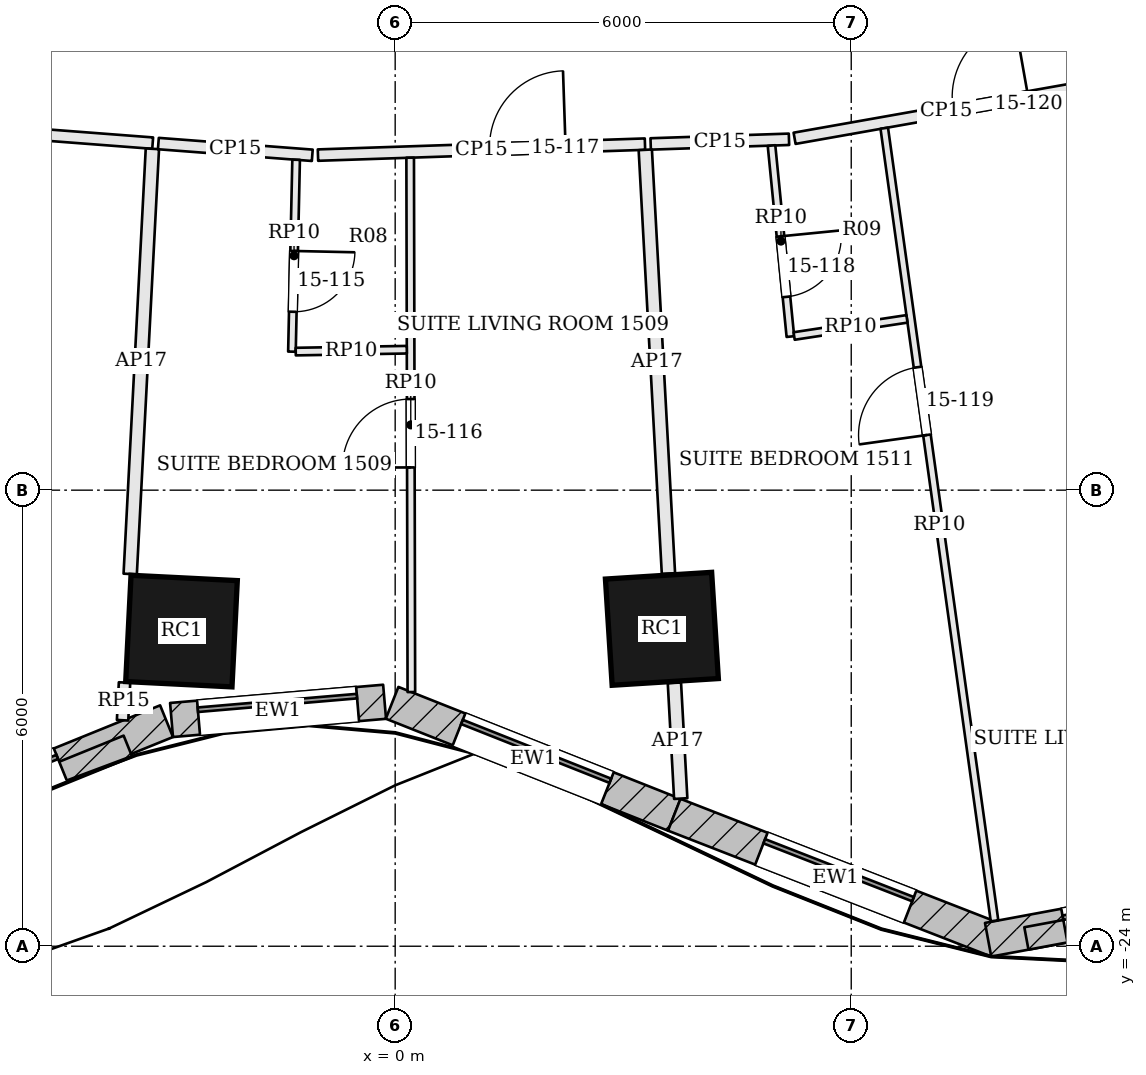
"""IFC4 building model, lengths in metres.
Left out: names, types, materials, properties, quantities, classifications, styles, units other than length and angle.
Written with IfcOpenShell. Run it as: python <this file> out.ifc"""

import sys

from ifc_helpers import new_model, si_unit, direction, frame, frame_2d, origin, origin_2d, place, context, subcontext, project, spatial, rectangle, extrude, element, fill, save


model = new_model("IFC4")
c1 = context("Model", 3, precision=1e-05, world=origin(), true_north=direction((0.0, 1.0)))
c2 = subcontext(c1, "Body", "Model", "MODEL_VIEW")
j1 = project(units=[si_unit("LENGTHUNIT", "METRE"), si_unit("PLANEANGLEUNIT", "RADIAN")], contexts=[c1])
p1 = place(None, origin())
s1 = spatial("IfcSite", under=j1, at=p1, CompositionType="ELEMENT")
p2 = place(p1, origin())
s2 = spatial("IfcBuilding", under=s1, at=p2, CompositionType="ELEMENT")
p3 = place(p2, frame((0.0, 0.0, 69.9)))
s3 = spatial("IfcBuildingStorey", under=s2, at=p3, CompositionType="ELEMENT", Elevation=69.9)
for number, where, z_axis, x_axis in (
    (1, (-2.811, -19.854, 0.0), (0.0, 0.0, 1.0), (0.999, -0.05, 0.0)),
    (2, (3.509, -19.824, 0.0), (0.0, 0.0, 1.0), (0.998, 0.063, 0.0)),
):
    element("IfcColumn", number, at=place(p3, frame(where, z_axis=z_axis, x_axis=x_axis)), inside=s3, PredefinedType="COLUMN", context=c2, shape_type="SweptSolid", body=[
        extrude(rectangle(XDim=1.4, YDim=1.4, at=origin_2d()), origin(), (0.0, 0.0, 1.0), 3.6),
    ])
p4 = place(p3, frame((-7.75, -22.964, 0.0), z_axis=(0.0, 0.0, 1.0), x_axis=(0.926629703254, 0.375975255897, 0.0)))
e3 = element("IfcWall", 3, at=p4, inside=s3, PredefinedType="SOLIDWALL", context=c2, shape_type="SweptSolid", body=[
    extrude(rectangle(XDim=5.118, YDim=0.45, at=frame_2d((2.559, 0.0))), origin(), (0.0, 0.0, 1.0), 3.4),
])
p5 = place(p4, frame((1.509, 0.0, 0.9)))
e4 = element("IfcOpeningElement", 4, at=p5, cuts=e3, PredefinedType="OPENING", context=c2, shape_type="SweptSolid", body=[
    extrude(rectangle(XDim=2.1, YDim=2.0, at=frame_2d((1.05, 1.0))), frame((0.0, 0.235, 0.0), z_axis=(0.0, -1.0, 0.0), x_axis=(1.0, 0.0, 0.0)), (0.0, 0.0, 1.0), 0.47),
])
p6 = place(p3, frame((-2.942, -21.024, 0.0), z_axis=(0.0, 0.0, 1.0), x_axis=(0.996362034459, 0.085221454389, 0.0)))
e5 = element("IfcWall", 5, at=p6, inside=s3, PredefinedType="SOLIDWALL", context=c2, shape_type="SweptSolid", body=[
    extrude(rectangle(XDim=2.813, YDim=0.45, at=frame_2d((1.407, 0.0))), origin(), (0.0, 0.0, 1.0), 3.4),
])
p7 = place(p6, frame((0.357, 0.0, 0.9)))
e6 = element("IfcOpeningElement", 6, at=p7, cuts=e5, PredefinedType="OPENING", context=c2, shape_type="SweptSolid", body=[
    extrude(rectangle(XDim=2.1, YDim=2.0, at=frame_2d((1.05, 1.0))), frame((0.0, 0.235, 0.0), z_axis=(0.0, -1.0, 0.0), x_axis=(1.0, 0.0, 0.0)), (0.0, 0.0, 1.0), 0.47),
])
p8 = place(p3, frame((-0.041, -20.798, 0.0), z_axis=(0.0, 0.0, 1.0), x_axis=(0.929539262027, -0.368723148649, 0.0)))
e7 = element("IfcWall", 7, at=p8, inside=s3, PredefinedType="SOLIDWALL", context=c2, shape_type="SweptSolid", body=[
    extrude(rectangle(XDim=3.995, YDim=0.45, at=frame_2d((1.997, 0.0))), origin(), (0.0, 0.0, 1.0), 3.4),
])
p9 = place(p8, frame((0.947, 0.0, 0.9)))
e8 = element("IfcOpeningElement", 8, at=p9, cuts=e7, PredefinedType="OPENING", context=c2, shape_type="SweptSolid", body=[
    extrude(rectangle(XDim=2.1, YDim=2.0, at=frame_2d((1.05, 1.0))), frame((0.0, 0.235, 0.0), z_axis=(0.0, -1.0, 0.0), x_axis=(1.0, 0.0, 0.0)), (0.0, 0.0, 1.0), 0.47),
])
p10 = place(p3, frame((3.672, -22.27, 0.0), z_axis=(0.0, 0.0, 1.0), x_axis=(0.931791503167, -0.36299393194, 0.0)))
e9 = element("IfcWall", 9, at=p10, inside=s3, PredefinedType="SOLIDWALL", context=c2, shape_type="SweptSolid", body=[
    extrude(rectangle(XDim=4.56, YDim=0.45, at=frame_2d((2.28, 0.0))), origin(), (0.0, 0.0, 1.0), 3.4),
])
p11 = place(p10, frame((1.23, 0.0, 0.9)))
e10 = element("IfcOpeningElement", 10, at=p11, cuts=e9, PredefinedType="OPENING", context=c2, shape_type="SweptSolid", body=[
    extrude(rectangle(XDim=2.1, YDim=2.0, at=frame_2d((1.05, 1.0))), frame((0.0, 0.235, 0.0), z_axis=(0.0, -1.0, 0.0), x_axis=(1.0, 0.0, 0.0)), (0.0, 0.0, 1.0), 0.47),
])
p12 = place(p3, frame((7.801, -23.915, 0.0), z_axis=(0.0, 0.0, 1.0), x_axis=(0.983186467795, 0.182604407242, 0.0)))
e11 = element("IfcWall", 11, at=p12, inside=s3, PredefinedType="SOLIDWALL", context=c2, shape_type="SweptSolid", body=[
    extrude(rectangle(XDim=4.141, YDim=0.45, at=frame_2d((2.07, 0.0))), origin(), (0.0, 0.0, 1.0), 3.4),
])
p13 = place(p12, frame((1.02, 0.0, 0.9)))
e12 = element("IfcOpeningElement", 12, at=p13, cuts=e11, PredefinedType="OPENING", context=c2, shape_type="SweptSolid", body=[
    extrude(rectangle(XDim=2.1, YDim=2.0, at=frame_2d((1.05, 1.0))), frame((0.0, 0.235, 0.0), z_axis=(0.0, -1.0, 0.0), x_axis=(1.0, 0.0, 0.0)), (0.0, 0.0, 1.0), 0.47),
])
p14 = place(p3, frame((-7.514, -22.99, 3.6), z_axis=(0.0, 0.0, 1.0), x_axis=(0.926627413994, 0.375980897966, 0.0)))
e13 = element("IfcWall", 13, at=p14, inside=s3, PredefinedType="PARAPET", context=c2, shape_type="SweptSolid", body=[
    extrude(rectangle(XDim=4.315, YDim=0.3, at=frame_2d((2.157, 0.0))), origin(), (0.0, 0.0, 1.0), 1.1),
])
p15 = place(p3, frame((8.304, -23.897, 3.6), z_axis=(0.0, 0.0, 1.0), x_axis=(0.983203460001, 0.182512893356, 0.0)))
e14 = element("IfcWall", 14, at=p15, inside=s3, PredefinedType="PARAPET", context=c2, shape_type="SweptSolid", body=[
    extrude(rectangle(XDim=3.529, YDim=0.3, at=frame_2d((1.764, 0.0))), origin(), (0.0, 0.0, 1.0), 1.1),
])
p16 = place(p3, frame((-7.08, -13.137, 0.0), z_axis=(0.0, 0.0, 1.0), x_axis=(0.997100321366, -0.076098285996, 0.0)))
e15 = element("IfcWall", 15, at=p16, inside=s3, PredefinedType="PARTITIONING", context=c2, shape_type="SweptSolid", body=[
    extrude(rectangle(XDim=3.901, YDim=0.15, at=frame_2d((1.951, 0.0))), origin(), (0.0, 0.0, 1.0), 2.68),
])
p17 = place(p3, frame((-3.586, -21.027, 0.0), z_axis=(0.0, 0.0, 1.0), x_axis=(0.052094522049, 0.99864215852, 0.0)))
e16 = element("IfcWall", 16, at=p17, inside=s3, PredefinedType="PARTITIONING", context=c2, shape_type="SweptSolid", body=[
    extrude(rectangle(XDim=0.497, YDim=0.15, at=frame_2d((0.249, 0.0))), origin(), (0.0, 0.0, 1.0), 3.4),
])
p18 = place(p3, frame((-3.486, -19.103, 0.0), z_axis=(0.0, 0.0, 1.0), x_axis=(0.052128748495, 0.998640372497, 0.0)))
e17 = element("IfcWall", 17, at=p18, inside=s3, PredefinedType="PARTITIONING", context=c2, shape_type="SweptSolid", body=[
    extrude(rectangle(XDim=5.601, YDim=0.175, at=frame_2d((2.801, 0.0))), origin(), (0.0, 0.0, 1.0), 2.68),
])
p19 = place(p3, frame((-3.115, -13.44, 0.0), z_axis=(0.0, 0.0, 1.0), x_axis=(0.997100272702, -0.076098923634, 0.0)))
e18 = element("IfcWall", 18, at=p19, inside=s3, PredefinedType="PARTITIONING", context=c2, shape_type="SweptSolid", body=[
    extrude(rectangle(XDim=2.031, YDim=0.15, at=frame_2d((1.015, 0.0))), origin(), (0.0, 0.0, 1.0), 2.68),
])
p20 = place(p3, frame((-1.016, -13.592, 0.0), z_axis=(0.0, 0.0, 1.0), x_axis=(0.999436122376, 0.03357733298, 0.0)))
e19 = element("IfcWall", 19, at=p20, inside=s3, PredefinedType="PARTITIONING", context=c2, shape_type="SweptSolid", body=[
    extrude(rectangle(XDim=4.304, YDim=0.15, at=frame_2d((2.152, 0.0))), origin(), (0.0, 0.0, 1.0), 2.68),
])
p21 = place(p20, frame((2.259, 0.0, 0.0)))
e20 = element("IfcOpeningElement", 20, at=p21, cuts=e19, PredefinedType="OPENING", context=c2, shape_type="SweptSolid", body=[
    extrude(rectangle(XDim=1.0, YDim=2.1, at=frame_2d((0.5, 1.05))), frame((0.0, 0.085, 0.0), z_axis=(0.0, -1.0, 0.0), x_axis=(1.0, 0.0, 0.0)), (0.0, 0.0, 1.0), 0.17),
])
p22 = place(p3, frame((3.757, -22.058, 0.0), z_axis=(0.0, 0.0, 1.0), x_axis=(-0.054592188309, 0.998508734552, 0.0)))
e21 = element("IfcWall", 21, at=p22, inside=s3, PredefinedType="PARTITIONING", context=c2, shape_type="SweptSolid", body=[
    extrude(rectangle(XDim=1.525, YDim=0.175, at=frame_2d((0.762, 0.0))), origin(), (0.0, 0.0, 1.0), 2.68),
])
p23 = place(p3, frame((3.595, -19.097, 0.0), z_axis=(0.0, 0.0, 1.0), x_axis=(-0.05457388759, 0.998509734952, 0.0)))
e22 = element("IfcWall", 22, at=p23, inside=s3, PredefinedType="PARTITIONING", context=c2, shape_type="SweptSolid", body=[
    extrude(rectangle(XDim=5.583, YDim=0.175, at=frame_2d((2.792, 0.0))), origin(), (0.0, 0.0, 1.0), 2.68),
])
p24 = place(p3, frame((3.361, -13.445, 0.0), z_axis=(0.0, 0.0, 1.0), x_axis=(0.999437889786, 0.033524684348, 0.0)))
e23 = element("IfcWall", 23, at=p24, inside=s3, PredefinedType="PARTITIONING", context=c2, shape_type="SweptSolid", body=[
    extrude(rectangle(XDim=1.821, YDim=0.15, at=frame_2d((0.91, 0.0))), origin(), (0.0, 0.0, 1.0), 2.68),
])
p25 = place(p3, frame((5.255, -13.371, 0.0), z_axis=(0.0, 0.0, 1.0), x_axis=(0.984678510279, 0.174379561289, 0.0)))
e24 = element("IfcWall", 24, at=p25, inside=s3, PredefinedType="PARTITIONING", context=c2, shape_type="SweptSolid", body=[
    extrude(rectangle(XDim=4.054, YDim=0.15, at=frame_2d((2.027, 0.0))), origin(), (0.0, 0.0, 1.0), 2.68),
])
p26 = place(p25, frame((2.121, 0.0, 0.0)))
e25 = element("IfcOpeningElement", 25, at=p26, cuts=e24, PredefinedType="OPENING", context=c2, shape_type="SweptSolid", body=[
    extrude(rectangle(XDim=1.0, YDim=2.1, at=frame_2d((0.5, 1.05))), frame((0.0, 0.085, 0.0), z_axis=(0.0, -1.0, 0.0), x_axis=(1.0, 0.0, 0.0)), (0.0, 0.0, 1.0), 0.17),
])
p27 = place(p3, frame((0.213, -20.656, 0.0), z_axis=(0.0, 0.0, 1.0), x_axis=(-0.002222679791, 0.999997529844, 0.0)))
e26 = element("IfcWall", 26, at=p27, inside=s3, PredefinedType="PARTITIONING", context=c2, shape_type="SweptSolid", body=[
    extrude(rectangle(XDim=7.03, YDim=0.1, at=frame_2d((3.515, 0.0))), origin(), (0.0, 0.0, 1.0), 2.898),
])
p28 = place(p27, frame((2.955, 0.0, 0.0)))
e27 = element("IfcOpeningElement", 27, at=p28, cuts=e26, PredefinedType="OPENING", context=c2, shape_type="SweptSolid", body=[
    extrude(rectangle(XDim=0.9, YDim=2.4, at=frame_2d((0.45, 1.2))), frame((0.0, 0.06, 0.0), z_axis=(0.0, -1.0, 0.0), x_axis=(1.0, 0.0, 0.0)), (0.0, 0.0, 1.0), 0.12),
])
p29 = place(p3, frame((-1.303, -13.653, 0.0), z_axis=(0.0, 0.0, 1.0), x_axis=(-0.021755004804, -0.999763331877, 0.0)))
e28 = element("IfcWall", 28, at=p29, inside=s3, PredefinedType="PARTITIONING", context=c2, shape_type="SweptSolid", body=[
    extrude(rectangle(XDim=2.525, YDim=0.1, at=frame_2d((1.262, 0.0))), origin(), (0.0, 0.0, 1.0), 2.898),
])
p30 = place(p29, frame((1.2, 0.0, 0.0)))
e29 = element("IfcOpeningElement", 29, at=p30, cuts=e28, PredefinedType="OPENING", context=c2, shape_type="SweptSolid", body=[
    extrude(rectangle(XDim=0.8, YDim=2.1, at=frame_2d((0.4, 1.05))), frame((0.0, 0.06, 0.0), z_axis=(0.0, -1.0, 0.0), x_axis=(1.0, 0.0, 0.0)), (0.0, 0.0, 1.0), 0.12),
])
p31 = place(p3, frame((-1.308, -16.177, 0.0), z_axis=(0.0, 0.0, 1.0), x_axis=(0.999854757889, 0.017042978828, 0.0)))
e30 = element("IfcWall", 30, at=p31, inside=s3, PredefinedType="PARTITIONING", context=c2, shape_type="SweptSolid", body=[
    extrude(rectangle(XDim=1.461, YDim=0.1, at=frame_2d((0.73, 0.0))), origin(), (0.0, 0.0, 1.0), 2.898),
])
p32 = place(p3, frame((7.885, -23.666, 0.0), z_axis=(0.0, 0.0, 1.0), x_axis=(-0.137793981423, 0.990460912244, 0.0)))
e31 = element("IfcWall", 31, at=p32, inside=s3, PredefinedType="PARTITIONING", context=c2, shape_type="SweptSolid", body=[
    extrude(rectangle(XDim=10.528, YDim=0.1, at=frame_2d((5.264, 0.0))), origin(), (0.0, 0.0, 1.0), 2.898),
])
p33 = place(p32, frame((6.453, 0.0, 0.0)))
e32 = element("IfcOpeningElement", 32, at=p33, cuts=e31, PredefinedType="OPENING", context=c2, shape_type="SweptSolid", body=[
    extrude(rectangle(XDim=0.9, YDim=2.4, at=frame_2d((0.45, 1.2))), frame((0.0, 0.06, 0.0), z_axis=(0.0, -1.0, 0.0), x_axis=(1.0, 0.0, 0.0)), (0.0, 0.0, 1.0), 0.12),
])
p34 = place(p3, frame((4.951, -13.467, 0.0), z_axis=(0.0, 0.0, 1.0), x_axis=(0.09832622732, -0.995154235795, 0.0)))
e33 = element("IfcWall", 33, at=p34, inside=s3, PredefinedType="PARTITIONING", context=c2, shape_type="SweptSolid", body=[
    extrude(rectangle(XDim=2.525, YDim=0.1, at=frame_2d((1.263, 0.0))), origin(), (0.0, 0.0, 1.0), 2.898),
])
p35 = place(p34, frame((1.2, 0.0, 0.0)))
e34 = element("IfcOpeningElement", 34, at=p35, cuts=e33, PredefinedType="OPENING", context=c2, shape_type="SweptSolid", body=[
    extrude(rectangle(XDim=0.8, YDim=2.1, at=frame_2d((0.4, 1.05))), frame((0.0, 0.06, 0.0), z_axis=(0.0, -1.0, 0.0), x_axis=(1.0, 0.0, 0.0)), (0.0, 0.0, 1.0), 0.12),
])
p36 = place(p3, frame((5.249, -15.972, 0.0), z_axis=(0.0, 0.0, 1.0), x_axis=(0.988672402225, 0.150089576851, 0.0)))
e35 = element("IfcWall", 35, at=p36, inside=s3, PredefinedType="PARTITIONING", context=c2, shape_type="SweptSolid", body=[
    extrude(rectangle(XDim=1.501, YDim=0.1, at=frame_2d((0.751, 0.0))), origin(), (0.0, 0.0, 1.0), 2.898),
])
p37 = place(p5, origin())
e36 = element("IfcWindow", 36, at=p37, inside=s3, PartitioningType="SINGLE_PANEL", PredefinedType="WINDOW", context=c2, shape_type="SweptSolid", body=[
    extrude(rectangle(XDim=2.1, YDim=2.0, at=frame_2d((1.05, 1.0))), frame((0.0, 0.135, 0.0), z_axis=(0.0, -1.0, 0.0), x_axis=(1.0, 0.0, 0.0)), (0.0, 0.0, 1.0), 0.06),
])
fill(e4, e36)
p38 = place(p7, origin())
e37 = element("IfcWindow", 37, at=p38, inside=s3, PartitioningType="SINGLE_PANEL", PredefinedType="WINDOW", context=c2, shape_type="SweptSolid", body=[
    extrude(rectangle(XDim=2.1, YDim=2.0, at=frame_2d((1.05, 1.0))), frame((0.0, 0.135, 0.0), z_axis=(0.0, -1.0, 0.0), x_axis=(1.0, 0.0, 0.0)), (0.0, 0.0, 1.0), 0.06),
])
fill(e6, e37)
p39 = place(p9, origin())
e38 = element("IfcWindow", 38, at=p39, inside=s3, PartitioningType="SINGLE_PANEL", PredefinedType="WINDOW", context=c2, shape_type="SweptSolid", body=[
    extrude(rectangle(XDim=2.1, YDim=2.0, at=frame_2d((1.05, 1.0))), frame((0.0, 0.135, 0.0), z_axis=(0.0, -1.0, 0.0), x_axis=(1.0, 0.0, 0.0)), (0.0, 0.0, 1.0), 0.06),
])
fill(e8, e38)
p40 = place(p11, origin())
e39 = element("IfcWindow", 39, at=p40, inside=s3, PartitioningType="SINGLE_PANEL", PredefinedType="WINDOW", context=c2, shape_type="SweptSolid", body=[
    extrude(rectangle(XDim=2.1, YDim=2.0, at=frame_2d((1.05, 1.0))), frame((0.0, 0.135, 0.0), z_axis=(0.0, -1.0, 0.0), x_axis=(1.0, 0.0, 0.0)), (0.0, 0.0, 1.0), 0.06),
])
fill(e10, e39)
p41 = place(p13, origin())
e40 = element("IfcWindow", 40, at=p41, inside=s3, PartitioningType="SINGLE_PANEL", PredefinedType="WINDOW", context=c2, shape_type="SweptSolid", body=[
    extrude(rectangle(XDim=2.1, YDim=2.0, at=frame_2d((1.05, 1.0))), frame((0.0, 0.135, 0.0), z_axis=(0.0, -1.0, 0.0), x_axis=(1.0, 0.0, 0.0)), (0.0, 0.0, 1.0), 0.06),
])
fill(e12, e40)
p42 = place(p30, origin())
e41 = element("IfcDoor", 41, at=p42, inside=s3, OperationType="SINGLE_SWING_LEFT", PredefinedType="DOOR", context=c2, shape_type="SweptSolid", body=[
    extrude(rectangle(XDim=0.8, YDim=2.1, at=frame_2d((0.4, 1.05))), frame((0.0, 0.025, 0.0), z_axis=(0.0, -1.0, 0.0), x_axis=(1.0, 0.0, 0.0)), (0.0, 0.0, 1.0), 0.05),
])
fill(e29, e41)
p43 = place(p28, origin())
e42 = element("IfcDoor", 42, at=p43, inside=s3, OperationType="SINGLE_SWING_LEFT", PredefinedType="DOOR", context=c2, shape_type="SweptSolid", body=[
    extrude(rectangle(XDim=0.9, YDim=2.4, at=frame_2d((0.45, 1.2))), frame((0.0, 0.025, 0.0), z_axis=(0.0, -1.0, 0.0), x_axis=(1.0, 0.0, 0.0)), (0.0, 0.0, 1.0), 0.05),
])
fill(e27, e42)
p44 = place(p21, origin())
e43 = element("IfcDoor", 43, at=p44, inside=s3, OperationType="SINGLE_SWING_RIGHT", PredefinedType="DOOR", context=c2, shape_type="SweptSolid", body=[
    extrude(rectangle(XDim=1.0, YDim=2.1, at=frame_2d((0.5, 1.05))), frame((0.0, 0.025, 0.0), z_axis=(0.0, -1.0, 0.0), x_axis=(1.0, 0.0, 0.0)), (0.0, 0.0, 1.0), 0.05),
])
fill(e20, e43)
p45 = place(p35, origin())
e44 = element("IfcDoor", 44, at=p45, inside=s3, OperationType="SINGLE_SWING_LEFT", PredefinedType="DOOR", context=c2, shape_type="SweptSolid", body=[
    extrude(rectangle(XDim=0.8, YDim=2.1, at=frame_2d((0.4, 1.05))), frame((0.0, 0.025, 0.0), z_axis=(0.0, -1.0, 0.0), x_axis=(1.0, 0.0, 0.0)), (0.0, 0.0, 1.0), 0.05),
])
fill(e34, e44)
p46 = place(p33, origin())
e45 = element("IfcDoor", 45, at=p46, inside=s3, OperationType="SINGLE_SWING_LEFT", PredefinedType="DOOR", context=c2, shape_type="SweptSolid", body=[
    extrude(rectangle(XDim=0.9, YDim=2.4, at=frame_2d((0.45, 1.2))), frame((0.0, 0.025, 0.0), z_axis=(0.0, -1.0, 0.0), x_axis=(1.0, 0.0, 0.0)), (0.0, 0.0, 1.0), 0.05),
])
fill(e32, e45)
p47 = place(p26, origin())
e46 = element("IfcDoor", 46, at=p47, inside=s3, OperationType="SINGLE_SWING_RIGHT", PredefinedType="DOOR", context=c2, shape_type="SweptSolid", body=[
    extrude(rectangle(XDim=1.0, YDim=2.1, at=frame_2d((0.5, 1.05))), frame((0.0, 0.025, 0.0), z_axis=(0.0, -1.0, 0.0), x_axis=(1.0, 0.0, 0.0)), (0.0, 0.0, 1.0), 0.05),
])
fill(e25, e46)
save(model, sys.argv[1])
